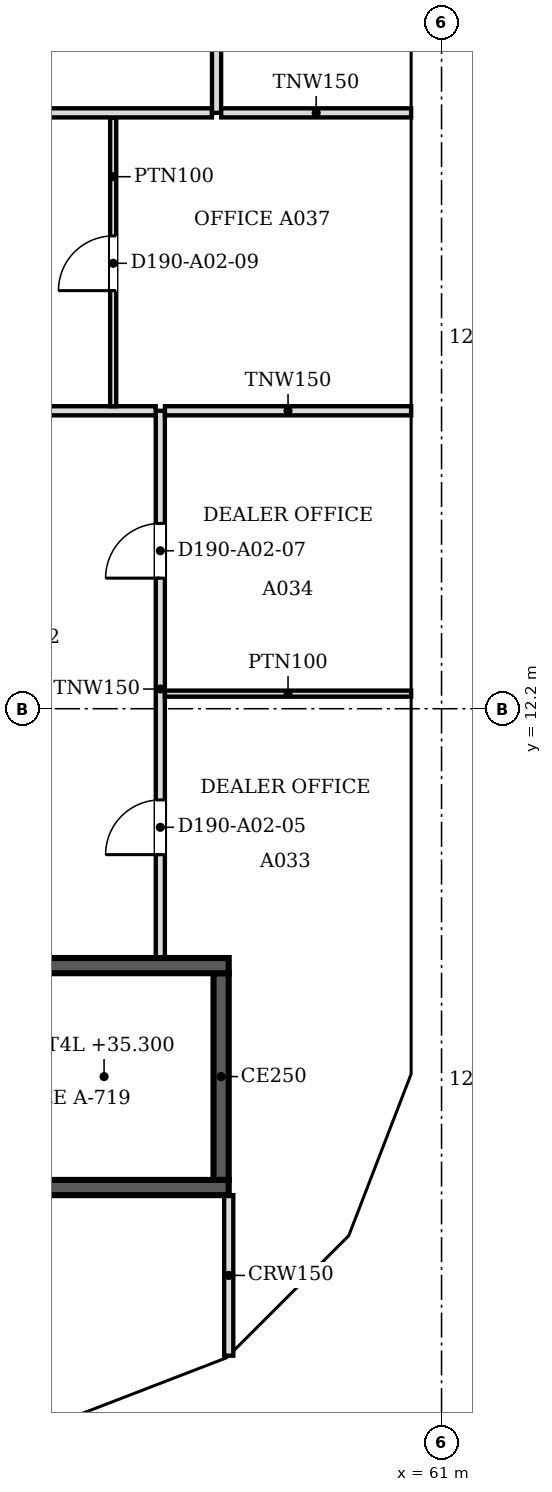
"""IFC4 building model, lengths in metres.
Left out: names, types, materials, properties, quantities, classifications, styles, units other than length and angle.
Written with IfcOpenShell. Run it as: python <this file> out.ifc"""

import sys

from ifc_helpers import new_model, si_unit, direction, frame, frame_2d, origin, place, context, subcontext, project, spatial, polyline, rectangle, outline, extrude, faceted_brep, source, transform, mapped, element, fill, save


model = new_model("IFC4")
c1 = context("Model", 3, precision=1e-05, world=origin(), true_north=direction((0.0, 1.0)))
c2 = subcontext(c1, "Body", "Model", "MODEL_VIEW")
j1 = project(units=[si_unit("LENGTHUNIT", "METRE"), si_unit("PLANEANGLEUNIT", "RADIAN")], contexts=[c1])
p1 = place(None, origin())
s1 = spatial("IfcSite", under=j1, at=p1, CompositionType="ELEMENT")
p2 = place(p1, origin())
s2 = spatial("IfcBuilding", under=s1, at=p2, CompositionType="ELEMENT")
p3 = place(p2, frame((0.0, 0.0, 33.4)))
s3 = spatial("IfcBuildingStorey", under=s2, at=p3, CompositionType="ELEMENT", Elevation=33.4)
m1 = source(origin(), c2, "Body", "Brep", [
    faceted_brep([(0.047, -0.25, 0.0), (2.997, -0.25, 3.8), (0.047, -0.25, 7.6), (0.0, -0.25, 7.541), (0.0, -0.25, 0.059), (0.093, 0.25, 7.54), (2.944, 0.25, 3.868), (2.944, 0.25, 3.732), (0.093, 0.25, 0.06), (2.997, 0.0, 3.8), (0.047, 0.0, 0.0), (0.047, 0.0, 7.6)], [[[0, 1, 2, 3, 4]], [[5, 6, 7, 8]], [[8, 7, 9, 1, 0, 10]], [[6, 5, 11, 2, 1, 9]], [[3, 2, 11]], [[10, 0, 4]], [[8, 10, 4, 3, 11, 5]], [[9, 7, 6]]]),
])
p4 = place(p3, frame((54.81, 0.233, -3.8), z_axis=(0.0, 0.0, 1.0), x_axis=(0.932990326376, 0.359901446078, 0.0)))
e1 = element("IfcWall", 1, at=p4, inside=s3, PredefinedType="SOLIDWALL", context=c2, shape_type="MappedRepresentation", body=[
    mapped(m1, transform((0.0, 0.0, 0.0), scale=1.0)),
])
m2 = source(origin(), c2, "Body", "SweptSolid", [
    extrude(outline(polyline([(0.247, 0.665), (2.681, 3.8), (0.247, 6.935), (0.247, 0.665)])), frame((0.0, 0.26, 0.0), z_axis=(0.0, -1.0, 0.0), x_axis=(1.0, 0.0, 0.0)), (0.0, 0.0, 1.0), 0.52),
])
p5 = place(p4, origin())
e2 = element("IfcOpeningElement", 2, at=p5, cuts=e1, PredefinedType="OPENING", context=c2, shape_type="MappedRepresentation", body=[
    mapped(m2, transform((0.0, 0.0, 0.0), scale=1.0)),
])
m3 = source(origin(), c2, "Body", "Brep", [
    faceted_brep([(2.944, -0.25, 0.0), (2.997, -0.25, 0.068), (2.997, -0.25, 7.532), (2.944, -0.25, 7.6), (0.0, -0.25, 3.8), (0.053, 0.25, 3.868), (2.891, 0.25, 7.532), (2.891, 0.25, 0.068), (0.053, 0.25, 3.731), (2.944, 0.0, 0.0), (2.944, 0.0, 7.6), (0.0, 0.0, 3.8)], [[[0, 1, 2, 3, 4]], [[5, 6, 7, 8]], [[1, 0, 9]], [[10, 3, 2]], [[6, 5, 11, 4, 3, 10]], [[8, 7, 9, 0, 4, 11]], [[8, 11, 5]], [[1, 9, 7, 6, 10, 2]]]),
])
p6 = place(p3, frame((57.606, 1.312, -3.8), z_axis=(0.0, 0.0, 1.0), x_axis=(0.707147509625, 0.707066050402, 0.0)))
e3 = element("IfcWall", 3, at=p6, inside=s3, PredefinedType="SOLIDWALL", context=c2, shape_type="MappedRepresentation", body=[
    mapped(m3, transform((0.0, 0.0, 0.0), scale=1.0)),
])
m4 = source(origin(), c2, "Body", "SweptSolid", [
    extrude(outline(polyline([(2.744, 6.934), (0.316, 3.8), (2.744, 0.666), (2.744, 6.934)])), frame((0.0, 0.26, 0.0), z_axis=(0.0, -1.0, 0.0), x_axis=(1.0, 0.0, 0.0)), (0.0, 0.0, 1.0), 0.52),
])
p7 = place(p6, origin())
e4 = element("IfcOpeningElement", 4, at=p7, cuts=e3, PredefinedType="OPENING", context=c2, shape_type="MappedRepresentation", body=[
    mapped(m4, transform((0.0, 0.0, 0.0), scale=1.0)),
])
m5 = source(origin(), c2, "Body", "Brep", [
    faceted_brep([(0.053, -0.25, 0.0), (3.003, -0.25, 3.8), (0.053, -0.25, 7.6), (0.0, -0.25, 7.531), (0.0, -0.25, 0.068), (0.106, 0.25, 7.532), (2.957, 0.25, 3.86), (2.957, 0.25, 3.74), (0.106, 0.25, 0.068), (3.003, 0.0, 3.8), (0.053, 0.0, 0.0), (0.053, 0.0, 7.6)], [[[0, 1, 2, 3, 4]], [[5, 6, 7, 8]], [[8, 7, 9, 1, 0, 10]], [[6, 5, 11, 2, 1, 9]], [[3, 2, 11]], [[10, 0, 4]], [[8, 10, 4, 3, 11, 5]], [[9, 7, 6]]]),
])
p8 = place(p3, frame((59.669, 3.344, -3.8), z_axis=(0.0, 0.0, 1.0), x_axis=(0.35992665181, 0.932980602862, 0.0)))
e5 = element("IfcWall", 5, at=p8, inside=s3, PredefinedType="SOLIDWALL", context=c2, shape_type="MappedRepresentation", body=[
    mapped(m5, transform((0.0, 0.0, 0.0), scale=1.0)),
])
m6 = source(origin(), c2, "Body", "SweptSolid", [
    extrude(outline(polyline([(0.253, 0.665), (2.687, 3.8), (0.253, 6.935), (0.253, 0.665)])), frame((0.0, 0.26, 0.0), z_axis=(0.0, -1.0, 0.0), x_axis=(1.0, 0.0, 0.0)), (0.0, 0.0, 1.0), 0.52),
])
p9 = place(p8, origin())
e6 = element("IfcOpeningElement", 6, at=p9, cuts=e5, PredefinedType="OPENING", context=c2, shape_type="MappedRepresentation", body=[
    mapped(m6, transform((0.0, 0.0, 0.0), scale=1.0)),
])
m7 = source(origin(), c2, "Body", "Brep", [
    faceted_brep([(3.003, -0.25, 0.0), (6.053, -0.25, 3.8), (3.003, -0.25, 7.6), (0.0, -0.25, 3.8), (0.047, 0.25, 3.859), (3.003, 0.25, 7.6), (6.053, 0.25, 3.8), (3.003, 0.25, 0.0), (0.047, 0.25, 3.741), (0.0, 0.0, 3.8)], [[[0, 1, 2, 3]], [[4, 5, 6, 7, 8]], [[7, 6, 1, 0]], [[6, 5, 2, 1]], [[5, 4, 9, 3, 2]], [[8, 7, 0, 3, 9]], [[8, 9, 4]]]),
])
p10 = place(p3, frame((60.75, 6.146, -3.8), z_axis=(0.0, 0.0, 1.0), x_axis=(0.0, 1.0, 0.0)))
e7 = element("IfcWall", 7, at=p10, inside=s3, PredefinedType="SOLIDWALL", context=c2, shape_type="MappedRepresentation", body=[
    mapped(m7, transform((0.0, 0.0, 0.0), scale=1.0)),
])
m8 = source(origin(), c2, "Body", "SweptSolid", [
    extrude(outline(polyline([(3.005, 0.401), (5.733, 3.8), (3.005, 7.199), (0.319, 3.8), (3.005, 0.401)])), frame((0.0, 0.26, 0.0), z_axis=(0.0, -1.0, 0.0), x_axis=(1.0, 0.0, 0.0)), (0.0, 0.0, 1.0), 0.52),
])
p11 = place(p10, origin())
e8 = element("IfcOpeningElement", 8, at=p11, cuts=e7, PredefinedType="OPENING", context=c2, shape_type="MappedRepresentation", body=[
    mapped(m8, transform((0.0, 0.0, 0.0), scale=1.0)),
])
m9 = source(origin(), c2, "Body", "SweptSolid", [
    extrude(outline(polyline([(3.05, 0.0), (6.1, 3.8), (3.05, 7.6), (0.0, 3.8), (3.05, 0.0)])), frame((0.0, 0.25, 0.0), z_axis=(0.0, -1.0, 0.0), x_axis=(1.0, 0.0, 0.0)), (0.0, 0.0, 1.0), 0.5),
])
p12 = place(p3, frame((60.75, 12.2, -3.8), z_axis=(0.0, 0.0, 1.0), x_axis=(0.0, 1.0, 0.0)))
e9 = element("IfcWall", 9, at=p12, inside=s3, PredefinedType="SOLIDWALL", context=c2, shape_type="MappedRepresentation", body=[
    mapped(m9, transform((0.0, 0.0, 0.0), scale=1.0)),
])
m10 = source(origin(), c2, "Body", "SweptSolid", [
    extrude(outline(polyline([(3.05, 0.399), (5.78, 3.8), (3.05, 7.2), (0.321, 3.8), (3.05, 0.399)])), frame((0.0, 0.26, 0.0), z_axis=(0.0, -1.0, 0.0), x_axis=(1.0, 0.0, 0.0)), (0.0, 0.0, 1.0), 0.52),
])
p13 = place(p12, origin())
e10 = element("IfcOpeningElement", 10, at=p13, cuts=e9, PredefinedType="OPENING", context=c2, shape_type="MappedRepresentation", body=[
    mapped(m10, transform((0.0, 0.0, 0.0), scale=1.0)),
])
m11 = source(origin(), c2, "Body", "Brep", [
    faceted_brep([(3.05, -0.25, 0.0), (6.1, -0.25, 3.8), (6.1, -0.25, 3.8), (3.05, -0.25, 7.6), (0.0, -0.25, 3.8), (0.0, 0.25, 3.8), (3.05, 0.25, 7.6), (6.1, 0.25, 3.8), (6.1, 0.25, 3.8), (3.05, 0.25, 0.0)], [[[0, 1, 2, 3, 4]], [[5, 6, 7, 8, 9]], [[9, 8, 1, 0]], [[7, 6, 3, 2]], [[6, 5, 4, 3]], [[5, 9, 0, 4]], [[1, 8, 7, 2]]]),
])
p14 = place(p3, frame((60.75, 18.3, -3.8), z_axis=(0.0, 0.0, 1.0), x_axis=(0.0, 1.0, 0.0)))
e11 = element("IfcWall", 11, at=p14, inside=s3, PredefinedType="SOLIDWALL", context=c2, shape_type="MappedRepresentation", body=[
    mapped(m11, transform((0.0, 0.0, 0.0), scale=1.0)),
])
p15 = place(p14, origin())
e12 = element("IfcOpeningElement", 12, at=p15, cuts=e11, PredefinedType="OPENING", context=c2, shape_type="MappedRepresentation", body=[
    mapped(m10, transform((0.0, 0.0, 0.0), scale=1.0)),
])
p16 = place(p2, frame((0.0, 0.0, 37.2)))
s4 = spatial("IfcBuildingStorey", under=s2, at=p16, CompositionType="ELEMENT", Elevation=37.2)
m12 = source(origin(), c2, "Body", "Brep", [
    faceted_brep([(2.95, -0.25, 0.0), (3.003, -0.25, 0.068), (3.003, -0.25, 7.532), (2.95, -0.25, 7.6), (0.0, -0.25, 3.8), (0.047, 0.25, 3.86), (2.898, 0.25, 7.532), (2.898, 0.25, 0.068), (0.047, 0.25, 3.74), (2.95, 0.0, 0.0), (2.95, 0.0, 7.6), (0.0, 0.0, 3.8)], [[[0, 1, 2, 3, 4]], [[5, 6, 7, 8]], [[1, 0, 9]], [[10, 3, 2]], [[6, 5, 11, 4, 3, 10]], [[8, 7, 9, 0, 4, 11]], [[8, 11, 5]], [[1, 9, 7, 6, 10, 2]]]),
])
p17 = place(p16, frame((54.854, 0.25, -3.8), z_axis=(0.0, 0.0, 1.0), x_axis=(0.932970071518, 0.359953949349, 0.0)))
e13 = element("IfcWall", 13, at=p17, inside=s4, PredefinedType="SOLIDWALL", context=c2, shape_type="MappedRepresentation", body=[
    mapped(m12, transform((0.0, 0.0, 0.0), scale=1.0)),
])
m13 = source(origin(), c2, "Body", "SweptSolid", [
    extrude(outline(polyline([(2.75, 6.935), (0.316, 3.8), (2.75, 0.665), (2.75, 6.935)])), frame((0.0, 0.26, 0.0), z_axis=(0.0, -1.0, 0.0), x_axis=(1.0, 0.0, 0.0)), (0.0, 0.0, 1.0), 0.52),
])
p18 = place(p17, origin())
e14 = element("IfcOpeningElement", 14, at=p18, cuts=e13, PredefinedType="OPENING", context=c2, shape_type="MappedRepresentation", body=[
    mapped(m13, transform((0.0, 0.0, 0.0), scale=1.0)),
])
m14 = source(origin(), c2, "Body", "Brep", [
    faceted_brep([(0.053, -0.25, 0.0), (2.997, -0.25, 3.8), (0.053, -0.25, 7.6), (0.0, -0.25, 7.532), (0.0, -0.25, 0.068), (0.106, 0.25, 7.532), (2.944, 0.25, 3.868), (2.944, 0.25, 3.732), (0.106, 0.25, 0.068), (2.997, 0.0, 3.8), (0.053, 0.0, 0.0), (0.053, 0.0, 7.6)], [[[0, 1, 2, 3, 4]], [[5, 6, 7, 8]], [[8, 7, 9, 1, 0, 10]], [[6, 5, 11, 2, 1, 9]], [[3, 2, 11]], [[10, 0, 4]], [[8, 10, 4, 3, 11, 5]], [[9, 7, 6]]]),
])
p19 = place(p16, frame((57.569, 1.274, -3.8), z_axis=(0.0, 0.0, 1.0), x_axis=(0.707066050402, 0.707147509625, 0.0)))
e15 = element("IfcWall", 15, at=p19, inside=s4, PredefinedType="SOLIDWALL", context=c2, shape_type="MappedRepresentation", body=[
    mapped(m14, transform((0.0, 0.0, 0.0), scale=1.0)),
])
m15 = source(origin(), c2, "Body", "SweptSolid", [
    extrude(outline(polyline([(0.253, 0.667), (2.681, 3.8), (0.253, 6.934), (0.253, 0.667)])), frame((0.0, 0.26, 0.0), z_axis=(0.0, -1.0, 0.0), x_axis=(1.0, 0.0, 0.0)), (0.0, 0.0, 1.0), 0.52),
])
p20 = place(p19, origin())
e16 = element("IfcOpeningElement", 16, at=p20, cuts=e15, PredefinedType="OPENING", context=c2, shape_type="MappedRepresentation", body=[
    mapped(m15, transform((0.0, 0.0, 0.0), scale=1.0)),
])
m16 = source(origin(), c2, "Body", "Brep", [
    faceted_brep([(2.95, -0.25, 0.0), (2.997, -0.25, 0.059), (2.997, -0.25, 7.541), (2.95, -0.25, 7.6), (0.0, -0.25, 3.8), (0.053, 0.25, 3.868), (2.904, 0.25, 7.54), (2.904, 0.25, 0.06), (0.053, 0.25, 3.732), (2.95, 0.0, 0.0), (2.95, 0.0, 7.6), (0.0, 0.0, 3.8)], [[[0, 1, 2, 3, 4]], [[5, 6, 7, 8]], [[1, 0, 9]], [[10, 3, 2]], [[6, 5, 11, 4, 3, 10]], [[8, 7, 9, 0, 4, 11]], [[8, 11, 5]], [[1, 9, 7, 6, 10, 2]]]),
])
p21 = place(p16, frame((59.688, 3.394, -3.8), z_axis=(0.0, 0.0, 1.0), x_axis=(0.359972353723, 0.932962970624, 0.0)))
e17 = element("IfcWall", 17, at=p21, inside=s4, PredefinedType="SOLIDWALL", context=c2, shape_type="MappedRepresentation", body=[
    mapped(m16, transform((0.0, 0.0, 0.0), scale=1.0)),
])
p22 = place(p21, origin())
e18 = element("IfcOpeningElement", 18, at=p22, cuts=e17, PredefinedType="OPENING", context=c2, shape_type="MappedRepresentation", body=[
    mapped(m13, transform((0.0, 0.0, 0.0), scale=1.0)),
])
m17 = source(origin(), c2, "Body", "Brep", [
    faceted_brep([(0.047, -0.25, 0.0), (3.05, -0.25, 3.8), (0.047, -0.25, 7.6), (0.0, -0.25, 7.54), (0.0, -0.25, 0.06), (0.093, 0.25, 7.541), (3.05, 0.25, 3.8), (0.093, 0.25, 0.059), (0.047, 0.0, 0.0), (0.047, 0.0, 7.6)], [[[0, 1, 2, 3, 4]], [[5, 6, 7]], [[7, 6, 1, 0, 8]], [[6, 5, 9, 2, 1]], [[3, 2, 9]], [[8, 0, 4]], [[7, 8, 4, 3, 9, 5]]]),
])
p23 = place(p16, frame((60.75, 6.1, -3.8), z_axis=(0.0, 0.0, 1.0), x_axis=(0.0, 1.0, 0.0)))
e19 = element("IfcWall", 19, at=p23, inside=s4, PredefinedType="SOLIDWALL", context=c2, shape_type="MappedRepresentation", body=[
    mapped(m17, transform((0.0, 0.0, 0.0), scale=1.0)),
])
m18 = source(origin(), c2, "Body", "SweptSolid", [
    extrude(outline(polyline([(0.247, 0.656), (2.731, 3.8), (0.247, 6.944), (0.247, 0.656)])), frame((0.0, 0.26, 0.0), z_axis=(0.0, -1.0, 0.0), x_axis=(1.0, 0.0, 0.0)), (0.0, 0.0, 1.0), 0.52),
])
p24 = place(p23, origin())
e20 = element("IfcOpeningElement", 20, at=p24, cuts=e19, PredefinedType="OPENING", context=c2, shape_type="MappedRepresentation", body=[
    mapped(m18, transform((0.0, 0.0, 0.0), scale=1.0)),
])
m19 = source(origin(), c2, "Body", "SweptSolid", [
    extrude(outline(polyline([(3.05, 0.0), (6.1, 3.8), (3.05, 7.6), (0.0, 3.8), (3.05, 0.0)])), frame((0.0, 0.25, 0.0), z_axis=(0.0, -1.0, 0.0), x_axis=(1.0, 0.0, 0.0)), (0.0, 0.0, 1.0), 0.5),
])
p25 = place(p16, frame((60.75, 9.15, -3.8), z_axis=(0.0, 0.0, 1.0), x_axis=(0.0, 1.0, 0.0)))
e21 = element("IfcWall", 21, at=p25, inside=s4, PredefinedType="SOLIDWALL", context=c2, shape_type="MappedRepresentation", body=[
    mapped(m19, transform((0.0, 0.0, 0.0), scale=1.0)),
])
m20 = source(origin(), c2, "Body", "SweptSolid", [
    extrude(outline(polyline([(3.05, 0.399), (5.78, 3.8), (3.05, 7.201), (0.321, 3.8), (3.05, 0.399)])), frame((0.0, 0.26, 0.0), z_axis=(0.0, -1.0, 0.0), x_axis=(1.0, 0.0, 0.0)), (0.0, 0.0, 1.0), 0.52),
])
p26 = place(p25, origin())
e22 = element("IfcOpeningElement", 22, at=p26, cuts=e21, PredefinedType="OPENING", context=c2, shape_type="MappedRepresentation", body=[
    mapped(m20, transform((0.0, 0.0, 0.0), scale=1.0)),
])
p27 = place(p16, frame((60.75, 15.25, -3.8), z_axis=(0.0, 0.0, 1.0), x_axis=(0.0, 1.0, 0.0)))
e23 = element("IfcWall", 23, at=p27, inside=s4, PredefinedType="SOLIDWALL", context=c2, shape_type="MappedRepresentation", body=[
    mapped(m19, transform((0.0, 0.0, 0.0), scale=1.0)),
])
p28 = place(p27, origin())
e24 = element("IfcOpeningElement", 24, at=p28, cuts=e23, PredefinedType="OPENING", context=c2, shape_type="MappedRepresentation", body=[
    mapped(m20, transform((0.0, 0.0, 0.0), scale=1.0)),
])
m21 = source(origin(), c2, "Body", "Brep", [
    faceted_brep([(3.05, -0.25, 0.0), (6.1, -0.25, 3.8), (6.1, -0.25, 3.8), (3.05, -0.25, 7.6), (0.0, -0.25, 3.8), (0.0, 0.25, 3.8), (3.05, 0.25, 7.6), (6.1, 0.25, 3.8), (6.1, 0.25, 3.8), (3.05, 0.25, 0.0)], [[[0, 1, 2, 3, 4]], [[5, 6, 7, 8, 9]], [[9, 8, 1, 0]], [[7, 6, 3, 2]], [[6, 5, 4, 3]], [[5, 9, 0, 4]], [[1, 8, 7, 2]]]),
])
p29 = place(p16, frame((60.75, 21.35, -3.8), z_axis=(0.0, 0.0, 1.0), x_axis=(0.0, 1.0, 0.0)))
e25 = element("IfcWall", 25, at=p29, inside=s4, PredefinedType="SOLIDWALL", context=c2, shape_type="MappedRepresentation", body=[
    mapped(m21, transform((0.0, 0.0, 0.0), scale=1.0)),
])
p30 = place(p29, origin())
e26 = element("IfcOpeningElement", 26, at=p30, cuts=e25, PredefinedType="OPENING", context=c2, shape_type="MappedRepresentation", body=[
    mapped(m20, transform((0.0, 0.0, 0.0), scale=1.0)),
])
p31 = place(p3, frame((57.5, 4.325, 0.0), z_axis=(0.0, 0.0, 1.0), x_axis=(-1.0, 0.0, 0.0)))
e27 = element("IfcWall", 27, at=p31, inside=s3, PredefinedType="SOLIDWALL", context=c2, shape_type="SweptSolid", body=[
    extrude(rectangle(XDim=8.5, YDim=0.25, at=frame_2d((4.25, 0.0))), origin(), (0.0, 0.0, 1.0), 3.8),
])
m22 = source(origin(), c2, "Body", "SweptSolid", [
    extrude(rectangle(XDim=1.2, YDim=2.1, at=frame_2d((0.6, 1.05))), frame((0.0, 0.135, 0.0), z_axis=(0.0, -1.0, 0.0), x_axis=(1.0, 0.0, 0.0)), (0.0, 0.0, 1.0), 0.27),
])
p32 = place(p31, frame((6.9, 0.0, 0.0)))
e28 = element("IfcOpeningElement", 28, at=p32, cuts=e27, PredefinedType="OPENING", context=c2, shape_type="MappedRepresentation", body=[
    mapped(m22, transform((0.0, 0.0, 0.0), scale=1.0)),
])
p33 = place(p3, frame((49.0, 7.975, 0.0), z_axis=(0.0, 0.0, 1.0), x_axis=(1.0, 0.0, 0.0)))
e29 = element("IfcWall", 29, at=p33, inside=s3, PredefinedType="SOLIDWALL", context=c2, shape_type="SweptSolid", body=[
    extrude(rectangle(XDim=8.5, YDim=0.25, at=frame_2d((4.25, 0.0))), origin(), (0.0, 0.0, 1.0), 3.8),
])
p34 = place(p3, frame((57.375, 7.85, 0.0), z_axis=(0.0, 0.0, 1.0), x_axis=(0.0, -1.0, 0.0)))
e30 = element("IfcWall", 30, at=p34, inside=s3, PredefinedType="SOLIDWALL", context=c2, shape_type="SweptSolid", body=[
    extrude(rectangle(XDim=3.4, YDim=0.25, at=frame_2d((1.7, 0.0))), origin(), (0.0, 0.0, 1.0), 3.8),
])
p35 = place(p3, frame((57.5, 1.559, 0.0), z_axis=(0.0, 0.0, 1.0), x_axis=(0.0, 1.0, 0.0)))
e31 = element("IfcWall", 31, at=p35, inside=s3, PredefinedType="PARTITIONING", context=c2, shape_type="SweptSolid", body=[
    extrude(rectangle(XDim=2.641, YDim=0.15, at=frame_2d((1.32, 0.0))), origin(), (0.0, 0.0, 1.0), 3.067),
])
p36 = place(p3, frame((56.375, 17.1, 0.0), z_axis=(0.0, 0.0, 1.0), x_axis=(0.0, -1.0, 0.0)))
e32 = element("IfcWall", 32, at=p36, inside=s3, PredefinedType="PARTITIONING", context=c2, shape_type="SweptSolid", body=[
    extrude(rectangle(XDim=9.0, YDim=0.15, at=frame_2d((4.5, 0.0))), origin(), (0.0, 0.0, 1.0), 3.067),
])
m23 = source(origin(), c2, "Body", "SweptSolid", [
    extrude(rectangle(XDim=0.9, YDim=2.1, at=frame_2d((0.45, 1.05))), frame((0.0, 0.085, 0.0), z_axis=(0.0, -1.0, 0.0), x_axis=(1.0, 0.0, 0.0)), (0.0, 0.0, 1.0), 0.17),
])
p37 = place(p36, frame((6.4, 0.0, 0.0)))
e33 = element("IfcOpeningElement", 33, at=p37, cuts=e32, PredefinedType="OPENING", context=c2, shape_type="MappedRepresentation", body=[
    mapped(m23, transform((0.0, 0.0, 0.0), scale=1.0)),
])
p38 = place(p36, frame((1.852, 0.0, 0.0)))
e34 = element("IfcOpeningElement", 34, at=p38, cuts=e32, PredefinedType="OPENING", context=c2, shape_type="MappedRepresentation", body=[
    mapped(m23, transform((0.0, 0.0, 0.0), scale=1.0)),
])
p39 = place(p3, frame((56.451, 12.448, 0.0), z_axis=(0.0, 0.0, 1.0), x_axis=(1.0, 0.0, 0.0)))
e35 = element("IfcWall", 35, at=p39, inside=s3, PredefinedType="PARTITIONING", context=c2, shape_type="SweptSolid", body=[
    extrude(rectangle(XDim=4.049, YDim=0.1, at=frame_2d((2.024, 0.0))), origin(), (0.0, 0.0, 1.0), 3.067),
])
p40 = place(p3, frame((45.476, 17.1, 0.0), z_axis=(0.0, 0.0, 1.0), x_axis=(1.0, 0.0, 0.0)))
e36 = element("IfcWall", 36, at=p40, inside=s3, PredefinedType="PARTITIONING", context=c2, shape_type="SweptSolid", body=[
    extrude(rectangle(XDim=10.823, YDim=0.15, at=frame_2d((5.412, 0.0))), origin(), (0.0, 0.0, 1.0), 3.067),
])
p41 = place(p3, frame((56.451, 17.1, 0.0), z_axis=(0.0, 0.0, 1.0), x_axis=(1.0, 0.0, 0.0)))
e37 = element("IfcWall", 37, at=p41, inside=s3, PredefinedType="PARTITIONING", context=c2, shape_type="SweptSolid", body=[
    extrude(rectangle(XDim=4.049, YDim=0.15, at=frame_2d((2.024, 0.0))), origin(), (0.0, 0.0, 1.0), 3.067),
])
p42 = place(p3, frame((55.6, 21.924, 0.0), z_axis=(0.0, 0.0, 1.0), x_axis=(0.0, -1.0, 0.0)))
e38 = element("IfcWall", 38, at=p42, inside=s3, PredefinedType="PARTITIONING", context=c2, shape_type="SweptSolid", body=[
    extrude(rectangle(XDim=4.748, YDim=0.1, at=frame_2d((2.374, 0.0))), origin(), (0.0, 0.0, 1.0), 3.067),
])
m24 = source(origin(), c2, "Body", "SweptSolid", [
    extrude(rectangle(XDim=0.9, YDim=2.1, at=frame_2d((0.45, 1.05))), frame((0.0, 0.06, 0.0), z_axis=(0.0, -1.0, 0.0), x_axis=(1.0, 0.0, 0.0)), (0.0, 0.0, 1.0), 0.12),
])
p43 = place(p42, frame((1.948, 0.0, 0.0)))
e39 = element("IfcOpeningElement", 39, at=p43, cuts=e38, PredefinedType="OPENING", context=c2, shape_type="MappedRepresentation", body=[
    mapped(m24, transform((0.0, 0.0, 0.0), scale=1.0)),
])
p44 = place(p3, frame((45.476, 22.0, 0.0), z_axis=(0.0, 0.0, 1.0), x_axis=(1.0, 0.0, 0.0)))
e40 = element("IfcWall", 40, at=p44, inside=s3, PredefinedType="PARTITIONING", context=c2, shape_type="SweptSolid", body=[
    extrude(rectangle(XDim=11.748, YDim=0.15, at=frame_2d((5.874, 0.0))), origin(), (0.0, 0.0, 1.0), 3.067),
])
p45 = place(p3, frame((57.3, 30.6, 0.0), z_axis=(0.0, 0.0, 1.0), x_axis=(0.0, -1.0, 0.0)))
e41 = element("IfcWall", 41, at=p45, inside=s3, PredefinedType="PARTITIONING", context=c2, shape_type="SweptSolid", body=[
    extrude(rectangle(XDim=8.6, YDim=0.15, at=frame_2d((4.3, 0.0))), origin(), (0.0, 0.0, 1.0), 3.067),
])
p46 = place(p45, frame((3.9, 0.0, 0.0)))
e42 = element("IfcOpeningElement", 42, at=p46, cuts=e41, PredefinedType="OPENING", context=c2, shape_type="MappedRepresentation", body=[
    mapped(m23, transform((0.0, 0.0, 0.0), scale=1.0)),
])
p47 = place(p3, frame((57.376, 22.0, 0.0), z_axis=(0.0, 0.0, 1.0), x_axis=(1.0, 0.0, 0.0)))
e43 = element("IfcWall", 43, at=p47, inside=s3, PredefinedType="PARTITIONING", context=c2, shape_type="SweptSolid", body=[
    extrude(rectangle(XDim=3.124, YDim=0.15, at=frame_2d((1.562, 0.0))), origin(), (0.0, 0.0, 1.0), 3.067),
])
m25 = source(origin(), c2, "Body", "SweptSolid", [
    extrude(rectangle(XDim=0.9, YDim=2.1, at=frame_2d((0.45, 1.05))), frame((0.0, 0.025, 0.0), z_axis=(0.0, -1.0, 0.0), x_axis=(1.0, 0.0, 0.0)), (0.0, 0.0, 1.0), 0.05),
])
p48 = place(p37, origin())
e44 = element("IfcDoor", 44, at=p48, inside=s3, OperationType="SINGLE_SWING_RIGHT", PredefinedType="DOOR", context=c2, shape_type="MappedRepresentation", body=[
    mapped(m25, transform((0.0, 0.0, 0.0), scale=1.0)),
])
fill(e33, e44)
p49 = place(p38, origin())
e45 = element("IfcDoor", 45, at=p49, inside=s3, OperationType="SINGLE_SWING_RIGHT", PredefinedType="DOOR", context=c2, shape_type="MappedRepresentation", body=[
    mapped(m25, transform((0.0, 0.0, 0.0), scale=1.0)),
])
fill(e34, e45)
p50 = place(p43, origin())
e46 = element("IfcDoor", 46, at=p50, inside=s3, OperationType="SINGLE_SWING_RIGHT", PredefinedType="DOOR", context=c2, shape_type="MappedRepresentation", body=[
    mapped(m25, transform((0.0, 0.0, 0.0), scale=1.0)),
])
fill(e39, e46)
save(model, sys.argv[1])
